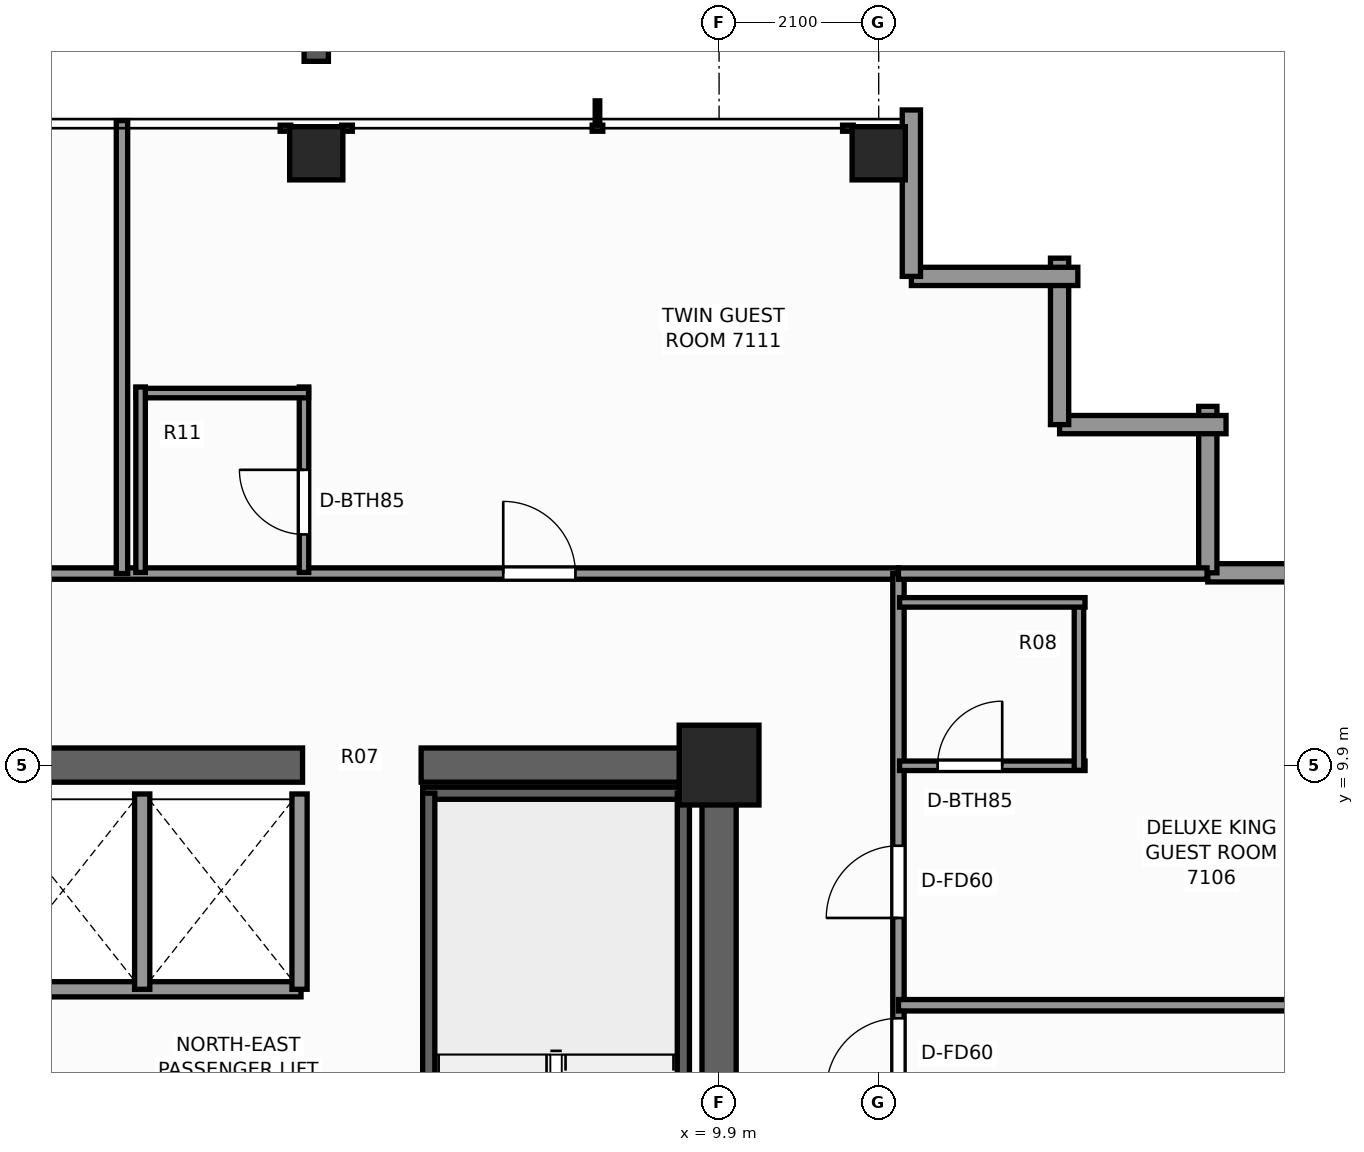
"""IFC4 building model, lengths in metres.
Left out: names, types, materials, properties, quantities, classifications, styles, units other than length and angle.
Written with IfcOpenShell. Run it as: python <this file> out.ifc"""

import sys

from ifc_helpers import new_model, si_unit, direction, frame, frame_2d, origin, origin_2d, place, context, subcontext, project, spatial, rectangle, extrude, element, fill, save


model = new_model("IFC4")
c1 = context("Model", 3, precision=1e-05, world=origin(), true_north=direction((0.0, 1.0)))
c2 = subcontext(c1, "Body", "Model", "MODEL_VIEW")
j1 = project(units=[si_unit("LENGTHUNIT", "METRE"), si_unit("PLANEANGLEUNIT", "RADIAN")], contexts=[c1])
p1 = place(None, origin())
s1 = spatial("IfcSite", under=j1, at=p1, CompositionType="ELEMENT")
p2 = place(p1, origin())
s2 = spatial("IfcBuilding", under=s1, at=p2, CompositionType="ELEMENT")
p3 = place(p2, frame((0.0, 0.0, 244.4)))
s3 = spatial("IfcBuildingStorey", under=s2, at=p3, CompositionType="ELEMENT", Elevation=244.4)
p4 = place(p3, frame((-10.125, 9.9, 0.0), z_axis=(0.0, 0.0, 1.0), x_axis=(1.0, 0.0, 0.0)))
e1 = element("IfcWall", 1, at=p4, inside=s3, PredefinedType="SHEAR", context=c2, shape_type="SweptSolid", body=[
    extrude(rectangle(XDim=14.545, YDim=0.45, at=frame_2d((7.272, 0.0))), origin(), (0.0, 0.0, 1.0), 3.5),
])
p5 = place(p3, frame((5.98, 9.9, 0.0), z_axis=(0.0, 0.0, 1.0), x_axis=(1.0, 0.0, 0.0)))
e2 = element("IfcWall", 2, at=p5, inside=s3, PredefinedType="SHEAR", context=c2, shape_type="SweptSolid", body=[
    extrude(rectangle(XDim=4.145, YDim=0.45, at=frame_2d((2.073, 0.0))), origin(), (0.0, 0.0, 1.0), 3.5),
])
p6 = place(p3, frame((9.9, -3.7, 0.0), z_axis=(0.0, 0.0, 1.0), x_axis=(0.0, 1.0, 0.0)))
e3 = element("IfcWall", 3, at=p6, inside=s3, PredefinedType="SHEAR", context=c2, shape_type="SweptSolid", body=[
    extrude(rectangle(XDim=13.375, YDim=0.45, at=frame_2d((6.688, 0.0))), origin(), (0.0, 0.0, 1.0), 3.5),
])
p7 = place(p6, frame((0.35, 0.0, 0.0)))
e4 = element("IfcOpeningElement", 4, at=p7, cuts=e3, PredefinedType="OPENING", context=c2, shape_type="SweptSolid", body=[
    extrude(rectangle(XDim=1.1, YDim=2.2, at=frame_2d((0.55, 1.1))), frame((0.0, 0.235, 0.0), z_axis=(0.0, -1.0, 0.0), x_axis=(1.0, 0.0, 0.0)), (0.0, 0.0, 1.0), 0.47),
])
p8 = place(p3, frame((9.9, 9.9, 0.0), z_axis=(0.0, 0.0, 1.0), x_axis=(1.0, 0.0, 0.0)))
e5 = element("IfcColumn", 5, at=p8, inside=s3, PredefinedType="COLUMN", context=c2, shape_type="SweptSolid", body=[
    extrude(rectangle(XDim=1.05, YDim=1.05, at=origin_2d()), origin(), (0.0, 0.0, 1.0), 3.5),
])
for number, where, z_axis, x_axis in (
    (6, (4.6, 17.95, 0.0), (0.0, 0.0, 1.0), (1.0, 0.0, 0.0)),
    (7, (12.0, 17.95, 0.0), (0.0, 0.0, 1.0), (1.0, 0.0, 0.0)),
):
    element("IfcColumn", number, at=place(p3, frame(where, z_axis=z_axis, x_axis=x_axis)), inside=s3, PredefinedType="COLUMN", context=c2, shape_type="SweptSolid", body=[
        extrude(rectangle(XDim=0.7, YDim=0.7, at=origin_2d()), origin(), (0.0, 0.0, 1.0), 3.5),
    ])
p9 = place(p3, frame((16.33, 12.43, 0.0), z_axis=(0.0, 0.0, 1.0), x_axis=(1.0, 0.0, 0.0)))
e8 = element("IfcWall", 8, at=p9, inside=s3, PredefinedType="STANDARD", context=c2, shape_type="SweptSolid", body=[
    extrude(rectangle(XDim=2.19, YDim=0.24, at=frame_2d((1.095, 0.0))), origin(), (0.0, 0.0, 1.0), 2.633),
])
for number, where, z_axis, x_axis in (
    (9, (16.33, 14.62, 0.0), (0.0, 0.0, 1.0), (0.0, -1.0, 0.0)),
    (10, (14.38, 14.38, 0.0), (0.0, 0.0, 1.0), (1.0, 0.0, 0.0)),
    (11, (14.38, 16.57, 0.0), (0.0, 0.0, 1.0), (0.0, -1.0, 0.0)),
    (12, (12.43, 16.33, 0.0), (0.0, 0.0, 1.0), (1.0, 0.0, 0.0)),
):
    element("IfcWall", number, at=place(p3, frame(where, z_axis=z_axis, x_axis=x_axis)), inside=s3, PredefinedType="STANDARD", context=c2, shape_type="SweptSolid", body=[
        extrude(rectangle(XDim=2.19, YDim=0.24, at=frame_2d((1.095, 0.0))), origin(), (0.0, 0.0, 1.0), 2.633),
    ])
p10 = place(p3, frame((12.43, 18.52, 0.0), z_axis=(0.0, 0.0, 1.0), x_axis=(0.0, -1.0, 0.0)))
e13 = element("IfcWall", 13, at=p10, inside=s3, PredefinedType="STANDARD", context=c2, shape_type="SweptSolid", body=[
    extrude(rectangle(XDim=2.19, YDim=0.24, at=frame_2d((1.095, 0.0))), origin(), (0.0, 0.0, 1.0), 2.633),
])
p11 = place(p3, frame((6.0, 9.53, 0.0), z_axis=(0.0, 0.0, 1.0), x_axis=(1.0, 0.0, 0.0)))
e14 = element("IfcWall", 14, at=p11, inside=s3, PredefinedType="SHEAR", context=c2, shape_type="SweptSolid", body=[
    extrude(rectangle(XDim=3.52, YDim=0.16, at=frame_2d((1.76, 0.0))), origin(), (0.0, 0.0, 1.0), 3.5),
])
for number, where, z_axis, x_axis in (
    (15, (6.08, 1.97, 0.0), (0.0, 0.0, 1.0), (0.0, 1.0, 0.0)),
    (16, (9.43, 1.97, 0.0), (0.0, 0.0, 1.0), (0.0, 1.0, 0.0)),
):
    element("IfcWall", number, at=place(p3, frame(where, z_axis=z_axis, x_axis=x_axis)), inside=s3, PredefinedType="SHEAR", context=c2, shape_type="SweptSolid", body=[
        extrude(rectangle(XDim=7.56, YDim=0.16, at=frame_2d((3.78, 0.0))), origin(), (0.0, 0.0, 1.0), 3.5),
    ])
p12 = place(p3, frame((0.22, 6.95, 0.0), z_axis=(0.0, 0.0, 1.0), x_axis=(1.0, 0.0, 0.0)))
e17 = element("IfcWall", 17, at=p12, inside=s3, PredefinedType="SOLIDWALL", context=c2, shape_type="SweptSolid", body=[
    extrude(rectangle(XDim=4.18, YDim=0.2, at=frame_2d((2.09, 0.0))), origin(), (0.0, 0.0, 1.0), 3.25),
])
for number, where, z_axis, x_axis in (
    (18, (4.38, 6.95, 0.0), (0.0, 0.0, 1.0), (0.0, 1.0, 0.0)),
    (19, (2.31, 6.95, 0.0), (0.0, 0.0, 1.0), (0.0, 1.0, 0.0)),
):
    element("IfcWall", number, at=place(p3, frame(where, z_axis=z_axis, x_axis=x_axis)), inside=s3, PredefinedType="SOLIDWALL", context=c2, shape_type="SweptSolid", body=[
        extrude(rectangle(XDim=2.57, YDim=0.2, at=frame_2d((1.285, 0.0))), origin(), (0.0, 0.0, 1.0), 3.25),
    ])
p13 = place(p3, frame((-12.58, 12.42, 0.0), z_axis=(0.0, 0.0, 1.0), x_axis=(1.0, 0.0, 0.0)))
e20 = element("IfcWall", 20, at=p13, inside=s3, PredefinedType="PARTITIONING", context=c2, shape_type="SweptSolid", body=[
    extrude(rectangle(XDim=24.84, YDim=0.15, at=frame_2d((12.42, 0.0))), origin(), (0.0, 0.0, 1.0), 2.539),
])
p14 = place(p13, frame((3.079, 0.0, 0.0)))
e21 = element("IfcOpeningElement", 21, at=p14, cuts=e20, PredefinedType="OPENING", context=c2, shape_type="SweptSolid", body=[
    extrude(rectangle(XDim=0.95, YDim=2.06, at=frame_2d((0.475, 1.03))), frame((0.0, 0.085, 0.0), z_axis=(0.0, -1.0, 0.0), x_axis=(1.0, 0.0, 0.0)), (0.0, 0.0, 1.0), 0.17),
])
p15 = place(p13, frame((10.075, 0.0, 0.0)))
e22 = element("IfcOpeningElement", 22, at=p15, cuts=e20, PredefinedType="OPENING", context=c2, shape_type="SweptSolid", body=[
    extrude(rectangle(XDim=0.95, YDim=2.06, at=frame_2d((0.475, 1.03))), frame((0.0, 0.085, 0.0), z_axis=(0.0, -1.0, 0.0), x_axis=(1.0, 0.0, 0.0)), (0.0, 0.0, 1.0), 0.17),
])
p16 = place(p13, frame((19.64, 0.0, 0.0)))
e23 = element("IfcOpeningElement", 23, at=p16, cuts=e20, PredefinedType="OPENING", context=c2, shape_type="SweptSolid", body=[
    extrude(rectangle(XDim=0.95, YDim=2.06, at=frame_2d((0.475, 1.03))), frame((0.0, 0.085, 0.0), z_axis=(0.0, -1.0, 0.0), x_axis=(1.0, 0.0, 0.0)), (0.0, 0.0, 1.0), 0.17),
])
p17 = place(p3, frame((12.26, -12.42, 0.0), z_axis=(0.0, 0.0, 1.0), x_axis=(0.0, 1.0, 0.0)))
e24 = element("IfcWall", 24, at=p17, inside=s3, PredefinedType="PARTITIONING", context=c2, shape_type="SweptSolid", body=[
    extrude(rectangle(XDim=24.84, YDim=0.15, at=frame_2d((12.42, 0.0))), origin(), (0.0, 0.0, 1.0), 2.539),
])
p18 = place(p17, frame((3.283, 0.0, 0.0)))
e25 = element("IfcOpeningElement", 25, at=p18, cuts=e24, PredefinedType="OPENING", context=c2, shape_type="SweptSolid", body=[
    extrude(rectangle(XDim=0.9, YDim=2.06, at=frame_2d((0.45, 1.03))), frame((0.0, 0.085, 0.0), z_axis=(0.0, -1.0, 0.0), x_axis=(1.0, 0.0, 0.0)), (0.0, 0.0, 1.0), 0.17),
])
p19 = place(p17, frame((9.915, 0.0, 0.0)))
e26 = element("IfcOpeningElement", 26, at=p19, cuts=e24, PredefinedType="OPENING", context=c2, shape_type="SweptSolid", body=[
    extrude(rectangle(XDim=0.95, YDim=2.06, at=frame_2d((0.475, 1.03))), frame((0.0, 0.085, 0.0), z_axis=(0.0, -1.0, 0.0), x_axis=(1.0, 0.0, 0.0)), (0.0, 0.0, 1.0), 0.17),
])
p20 = place(p17, frame((18.038, 0.0, 0.0)))
e27 = element("IfcOpeningElement", 27, at=p20, cuts=e24, PredefinedType="OPENING", context=c2, shape_type="SweptSolid", body=[
    extrude(rectangle(XDim=0.95, YDim=2.06, at=frame_2d((0.475, 1.03))), frame((0.0, 0.085, 0.0), z_axis=(0.0, -1.0, 0.0), x_axis=(1.0, 0.0, 0.0)), (0.0, 0.0, 1.0), 0.17),
])
p21 = place(p17, frame((20.309, 0.0, 0.0)))
e28 = element("IfcOpeningElement", 28, at=p21, cuts=e24, PredefinedType="OPENING", context=c2, shape_type="SweptSolid", body=[
    extrude(rectangle(XDim=0.95, YDim=2.06, at=frame_2d((0.475, 1.03))), frame((0.0, 0.085, 0.0), z_axis=(0.0, -1.0, 0.0), x_axis=(1.0, 0.0, 0.0)), (0.0, 0.0, 1.0), 0.17),
])
p22 = place(p3, frame((12.26, 12.42, 0.0), z_axis=(0.0, 0.0, 1.0), x_axis=(1.0, 0.0, 0.0)))
e29 = element("IfcWall", 29, at=p22, inside=s3, PredefinedType="PARTITIONING", context=c2, shape_type="SweptSolid", body=[
    extrude(rectangle(XDim=4.06, YDim=0.15, at=frame_2d((2.03, 0.0))), origin(), (0.0, 0.0, 1.0), 3.25),
])
p23 = place(p3, frame((12.26, 6.74, 0.0), z_axis=(0.0, 0.0, 1.0), x_axis=(1.0, 0.0, 0.0)))
e30 = element("IfcWall", 30, at=p23, inside=s3, PredefinedType="PARTITIONING", context=c2, shape_type="SweptSolid", body=[
    extrude(rectangle(XDim=6.12, YDim=0.15, at=frame_2d((3.06, 0.0))), origin(), (0.0, 0.0, 1.0), 2.623),
])
p24 = place(p3, frame((12.275, 9.891, 0.0), z_axis=(0.0, 0.0, 1.0), x_axis=(1.0, 0.0, 0.0)))
e31 = element("IfcWall", 31, at=p24, inside=s3, PredefinedType="PARTITIONING", context=c2, shape_type="SweptSolid", body=[
    extrude(rectangle(XDim=2.44, YDim=0.125, at=frame_2d((1.22, 0.0))), origin(), (0.0, 0.0, 1.0), 3.25),
])
p25 = place(p24, frame((0.5, 0.0, 0.0)))
e32 = element("IfcOpeningElement", 32, at=p25, cuts=e31, PredefinedType="OPENING", context=c2, shape_type="SweptSolid", body=[
    extrude(rectangle(XDim=0.85, YDim=2.03, at=frame_2d((0.425, 1.015))), frame((0.0, 0.073, 0.0), z_axis=(0.0, -1.0, 0.0), x_axis=(1.0, 0.0, 0.0)), (0.0, 0.0, 1.0), 0.145),
])
p26 = place(p3, frame((14.635, 9.831, 0.0), z_axis=(0.0, 0.0, 1.0), x_axis=(0.0, 1.0, 0.0)))
e33 = element("IfcWall", 33, at=p26, inside=s3, PredefinedType="PARTITIONING", context=c2, shape_type="SweptSolid", body=[
    extrude(rectangle(XDim=2.27, YDim=0.125, at=frame_2d((1.135, 0.0))), origin(), (0.0, 0.0, 1.0), 2.539),
])
p27 = place(p3, frame((12.275, 12.041, 0.0), z_axis=(0.0, 0.0, 1.0), x_axis=(1.0, 0.0, 0.0)))
e34 = element("IfcWall", 34, at=p27, inside=s3, PredefinedType="PARTITIONING", context=c2, shape_type="SweptSolid", body=[
    extrude(rectangle(XDim=2.44, YDim=0.125, at=frame_2d((1.22, 0.0))), origin(), (0.0, 0.0, 1.0), 3.25),
])
p28 = place(p3, frame((2.044, 12.42, 0.0), z_axis=(0.0, 0.0, 1.0), x_axis=(0.0, 1.0, 0.0)))
e35 = element("IfcWall", 35, at=p28, inside=s3, PredefinedType="PARTITIONING", context=c2, shape_type="SweptSolid", body=[
    extrude(rectangle(XDim=5.96, YDim=0.15, at=frame_2d((2.98, 0.0))), origin(), (0.0, 0.0, 1.0), 2.623),
])
p29 = place(p3, frame((4.439, 12.435, 0.0), z_axis=(0.0, 0.0, 1.0), x_axis=(0.0, 1.0, 0.0)))
e36 = element("IfcWall", 36, at=p29, inside=s3, PredefinedType="PARTITIONING", context=c2, shape_type="SweptSolid", body=[
    extrude(rectangle(XDim=2.44, YDim=0.125, at=frame_2d((1.22, 0.0))), origin(), (0.0, 0.0, 1.0), 2.539),
])
p30 = place(p29, frame((0.5, 0.0, 0.0)))
e37 = element("IfcOpeningElement", 37, at=p30, cuts=e36, PredefinedType="OPENING", context=c2, shape_type="SweptSolid", body=[
    extrude(rectangle(XDim=0.85, YDim=2.03, at=frame_2d((0.425, 1.015))), frame((0.0, 0.073, 0.0), z_axis=(0.0, -1.0, 0.0), x_axis=(1.0, 0.0, 0.0)), (0.0, 0.0, 1.0), 0.145),
])
p31 = place(p3, frame((2.229, 14.795, 0.0), z_axis=(0.0, 0.0, 1.0), x_axis=(1.0, 0.0, 0.0)))
e38 = element("IfcWall", 38, at=p31, inside=s3, PredefinedType="PARTITIONING", context=c2, shape_type="SweptSolid", body=[
    extrude(rectangle(XDim=2.27, YDim=0.125, at=frame_2d((1.135, 0.0))), origin(), (0.0, 0.0, 1.0), 2.539),
])
p32 = place(p3, frame((2.289, 12.435, 0.0), z_axis=(0.0, 0.0, 1.0), x_axis=(0.0, 1.0, 0.0)))
e39 = element("IfcWall", 39, at=p32, inside=s3, PredefinedType="PARTITIONING", context=c2, shape_type="SweptSolid", body=[
    extrude(rectangle(XDim=2.44, YDim=0.125, at=frame_2d((1.22, 0.0))), origin(), (0.0, 0.0, 1.0), 3.25),
])
p33 = place(p20, origin())
e40 = element("IfcDoor", 40, at=p33, inside=s3, OperationType="SINGLE_SWING_LEFT", PredefinedType="DOOR", context=c2, shape_type="SweptSolid", body=[
    extrude(rectangle(XDim=0.95, YDim=2.06, at=frame_2d((0.475, 1.03))), frame((0.0, 0.025, 0.0), z_axis=(0.0, -1.0, 0.0), x_axis=(1.0, 0.0, 0.0)), (0.0, 0.0, 1.0), 0.05),
])
fill(e27, e40)
p34 = place(p25, origin())
e41 = element("IfcDoor", 41, at=p34, inside=s3, OperationType="SINGLE_SWING_RIGHT", PredefinedType="DOOR", context=c2, shape_type="SweptSolid", body=[
    extrude(rectangle(XDim=0.85, YDim=2.03, at=frame_2d((0.425, 1.015))), frame((0.0, 0.025, 0.0), z_axis=(0.0, -1.0, 0.0), x_axis=(1.0, 0.0, 0.0)), (0.0, 0.0, 1.0), 0.05),
])
fill(e32, e41)
p35 = place(p21, origin())
e42 = element("IfcDoor", 42, at=p35, inside=s3, OperationType="SINGLE_SWING_LEFT", PredefinedType="DOOR", context=c2, shape_type="SweptSolid", body=[
    extrude(rectangle(XDim=0.95, YDim=2.06, at=frame_2d((0.475, 1.03))), frame((0.0, 0.025, 0.0), z_axis=(0.0, -1.0, 0.0), x_axis=(1.0, 0.0, 0.0)), (0.0, 0.0, 1.0), 0.05),
])
fill(e28, e42)
p36 = place(p30, origin())
e43 = element("IfcDoor", 43, at=p36, inside=s3, OperationType="SINGLE_SWING_RIGHT", PredefinedType="DOOR", context=c2, shape_type="SweptSolid", body=[
    extrude(rectangle(XDim=0.85, YDim=2.03, at=frame_2d((0.425, 1.015))), frame((0.0, 0.025, 0.0), z_axis=(0.0, -1.0, 0.0), x_axis=(1.0, 0.0, 0.0)), (0.0, 0.0, 1.0), 0.05),
])
fill(e37, e43)
p37 = place(p16, origin())
e44 = element("IfcDoor", 44, at=p37, inside=s3, OperationType="SINGLE_SWING_LEFT", PredefinedType="DOOR", context=c2, shape_type="SweptSolid", body=[
    extrude(rectangle(XDim=0.95, YDim=2.06, at=frame_2d((0.475, 1.03))), frame((0.0, 0.025, 0.0), z_axis=(0.0, -1.0, 0.0), x_axis=(1.0, 0.0, 0.0)), (0.0, 0.0, 1.0), 0.05),
])
fill(e23, e44)
save(model, sys.argv[1])
